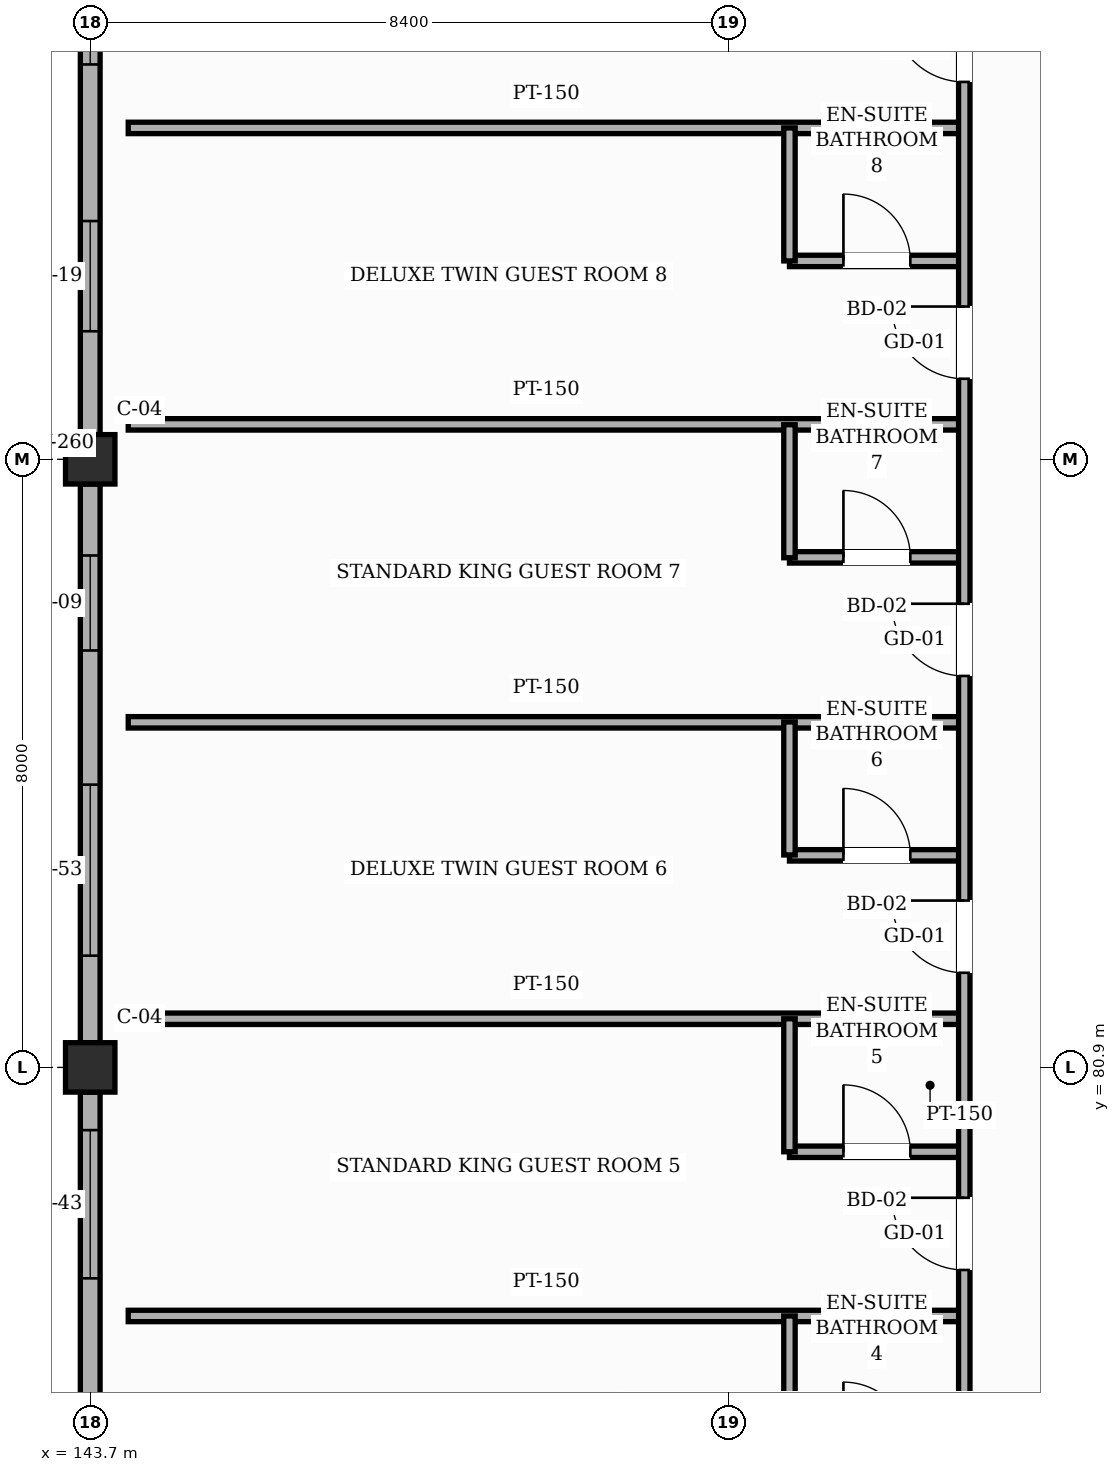
"""IFC4 building model, lengths in metres.
Left out: names, types, materials, properties, quantities, classifications, styles, units other than length and angle.
Written with IfcOpenShell. Run it as: python <this file> out.ifc"""

import sys

from ifc_helpers import new_model, si_unit, direction, frame, frame_2d, origin, origin_2d, place, context, subcontext, project, spatial, rectangle, hollow_rectangle, extrude, element, fill, save


model = new_model("IFC4")
c1 = context("Model", 3, precision=1e-05, world=origin(), true_north=direction((0.0, 1.0)))
c2 = subcontext(c1, "Body", "Model", "MODEL_VIEW")
j1 = project(units=[si_unit("LENGTHUNIT", "METRE"), si_unit("PLANEANGLEUNIT", "RADIAN")], contexts=[c1])
p1 = place(None, origin())
s1 = spatial("IfcSite", under=j1, at=p1, CompositionType="ELEMENT")
p2 = place(p1, origin())
s2 = spatial("IfcBuilding", under=s1, at=p2, CompositionType="ELEMENT")
p3 = place(p2, frame((0.0, 0.0, 15.0)))
s3 = spatial("IfcBuildingStorey", under=s2, at=p3, CompositionType="ELEMENT", Elevation=15.0)
for number, where, z_axis, x_axis in (
    (1, (143.7, 80.9, 0.0), (0.0, 0.0, 1.0), (1.0, 0.0, 0.0)),
    (2, (143.7, 88.9, 0.0), (0.0, 0.0, 1.0), (1.0, 0.0, 0.0)),
):
    element("IfcColumn", number, at=place(p3, frame(where, z_axis=z_axis, x_axis=x_axis)), inside=s3, PredefinedType="COLUMN", context=c2, shape_type="SweptSolid", body=[
        extrude(hollow_rectangle(XDim=0.65, YDim=0.65, WallThickness=0.025, InnerFilletRadius=0.025, OuterFilletRadius=0.05, at=origin_2d()), origin(), (0.0, 0.0, 1.0), 4.8),
    ])
p4 = place(p3, frame((143.7, 73.675, 0.0), z_axis=(0.0, 0.0, 1.0), x_axis=(0.0, 1.0, 0.0)))
e3 = element("IfcWall", 3, at=p4, inside=s3, PredefinedType="SOLIDWALL", context=c2, shape_type="SweptSolid", body=[
    extrude(rectangle(XDim=6.9, YDim=0.26, at=frame_2d((3.45, 0.0))), origin(), (0.0, 0.0, 1.0), 3.985),
])
p5 = place(p4, frame((1.125, 0.0, 0.85)))
e4 = element("IfcOpeningElement", 4, at=p5, cuts=e3, PredefinedType="OPENING", context=c2, shape_type="SweptSolid", body=[
    extrude(rectangle(XDim=1.75, YDim=1.65, at=frame_2d((0.875, 0.825))), frame((0.0, 0.14, 0.0), z_axis=(0.0, -1.0, 0.0), x_axis=(1.0, 0.0, 0.0)), (0.0, 0.0, 1.0), 0.28),
])
p6 = place(p4, frame((4.45, 0.0, 0.85)))
e5 = element("IfcOpeningElement", 5, at=p6, cuts=e3, PredefinedType="OPENING", context=c2, shape_type="SweptSolid", body=[
    extrude(rectangle(XDim=1.95, YDim=1.65, at=frame_2d((0.975, 0.825))), frame((0.0, 0.14, 0.0), z_axis=(0.0, -1.0, 0.0), x_axis=(1.0, 0.0, 0.0)), (0.0, 0.0, 1.0), 0.28),
])
p7 = place(p3, frame((143.7, 81.225, 0.0), z_axis=(0.0, 0.0, 1.0), x_axis=(0.0, 1.0, 0.0)))
e6 = element("IfcWall", 6, at=p7, inside=s3, PredefinedType="SOLIDWALL", context=c2, shape_type="SweptSolid", body=[
    extrude(rectangle(XDim=7.35, YDim=0.26, at=frame_2d((3.675, 0.0))), origin(), (0.0, 0.0, 1.0), 3.985),
])
p8 = place(p7, frame((1.145, 0.0, 0.85)))
e7 = element("IfcOpeningElement", 7, at=p8, cuts=e6, PredefinedType="OPENING", context=c2, shape_type="SweptSolid", body=[
    extrude(rectangle(XDim=2.25, YDim=1.65, at=frame_2d((1.125, 0.825))), frame((0.0, 0.14, 0.0), z_axis=(0.0, -1.0, 0.0), x_axis=(1.0, 0.0, 0.0)), (0.0, 0.0, 1.0), 0.28),
])
p9 = place(p7, frame((5.16, 0.0, 0.85)))
e8 = element("IfcOpeningElement", 8, at=p9, cuts=e6, PredefinedType="OPENING", context=c2, shape_type="SweptSolid", body=[
    extrude(rectangle(XDim=1.25, YDim=1.8, at=frame_2d((0.625, 0.9))), frame((0.0, 0.14, 0.0), z_axis=(0.0, -1.0, 0.0), x_axis=(1.0, 0.0, 0.0)), (0.0, 0.0, 1.0), 0.28),
])
p10 = place(p3, frame((143.7, 89.225, 0.0), z_axis=(0.0, 0.0, 1.0), x_axis=(0.0, 1.0, 0.0)))
e9 = element("IfcWall", 9, at=p10, inside=s3, PredefinedType="SOLIDWALL", context=c2, shape_type="SweptSolid", body=[
    extrude(rectangle(XDim=7.35, YDim=0.26, at=frame_2d((3.675, 0.0))), origin(), (0.0, 0.0, 1.0), 3.985),
])
p11 = place(p10, frame((1.36, 0.0, 0.85)))
e10 = element("IfcOpeningElement", 10, at=p11, cuts=e9, PredefinedType="OPENING", context=c2, shape_type="SweptSolid", body=[
    extrude(rectangle(XDim=1.45, YDim=1.8, at=frame_2d((0.725, 0.9))), frame((0.0, 0.14, 0.0), z_axis=(0.0, -1.0, 0.0), x_axis=(1.0, 0.0, 0.0)), (0.0, 0.0, 1.0), 0.28),
])
p12 = place(p10, frame((4.87, 0.0, 0.85)))
e11 = element("IfcOpeningElement", 11, at=p12, cuts=e9, PredefinedType="OPENING", context=c2, shape_type="SweptSolid", body=[
    extrude(rectangle(XDim=1.65, YDim=1.8, at=frame_2d((0.825, 0.9))), frame((0.0, 0.14, 0.0), z_axis=(0.0, -1.0, 0.0), x_axis=(1.0, 0.0, 0.0)), (0.0, 0.0, 1.0), 0.28),
])
p13 = place(p3, frame((144.2, 77.63, 0.0), z_axis=(0.0, 0.0, 1.0), x_axis=(1.0, 0.0, 0.0)))
e12 = element("IfcWall", 12, at=p13, inside=s3, PredefinedType="PARTITIONING", context=c2, shape_type="SweptSolid", body=[
    extrude(rectangle(XDim=11.0, YDim=0.15, at=frame_2d((5.5, 0.0))), origin(), (0.0, 0.0, 1.0), 4.545),
])
p14 = place(p3, frame((152.9, 79.79, 0.0), z_axis=(0.0, 0.0, 1.0), x_axis=(1.0, 0.0, 0.0)))
e13 = element("IfcWall", 13, at=p14, inside=s3, PredefinedType="PARTITIONING", context=c2, shape_type="SweptSolid", body=[
    extrude(rectangle(XDim=2.3, YDim=0.15, at=frame_2d((1.15, 0.0))), origin(), (0.0, 0.0, 1.0), 4.545),
])
p15 = place(p14, frame((0.71, 0.0, 0.0)))
e14 = element("IfcOpeningElement", 14, at=p15, cuts=e13, PredefinedType="OPENING", context=c2, shape_type="SweptSolid", body=[
    extrude(rectangle(XDim=0.88, YDim=2.12, at=frame_2d((0.44, 1.06))), frame((0.0, 0.085, 0.0), z_axis=(0.0, -1.0, 0.0), x_axis=(1.0, 0.0, 0.0)), (0.0, 0.0, 1.0), 0.17),
])
p16 = place(p3, frame((144.2, 81.54, 0.0), z_axis=(0.0, 0.0, 1.0), x_axis=(1.0, 0.0, 0.0)))
e15 = element("IfcWall", 15, at=p16, inside=s3, PredefinedType="PARTITIONING", context=c2, shape_type="SweptSolid", body=[
    extrude(rectangle(XDim=11.0, YDim=0.15, at=frame_2d((5.5, 0.0))), origin(), (0.0, 0.0, 1.0), 4.545),
])
p17 = place(p3, frame((152.9, 83.69, 0.0), z_axis=(0.0, 0.0, 1.0), x_axis=(1.0, 0.0, 0.0)))
e16 = element("IfcWall", 16, at=p17, inside=s3, PredefinedType="PARTITIONING", context=c2, shape_type="SweptSolid", body=[
    extrude(rectangle(XDim=2.3, YDim=0.15, at=frame_2d((1.15, 0.0))), origin(), (0.0, 0.0, 1.0), 4.545),
])
p18 = place(p17, frame((0.71, 0.0, 0.0)))
e17 = element("IfcOpeningElement", 17, at=p18, cuts=e16, PredefinedType="OPENING", context=c2, shape_type="SweptSolid", body=[
    extrude(rectangle(XDim=0.88, YDim=2.12, at=frame_2d((0.44, 1.06))), frame((0.0, 0.085, 0.0), z_axis=(0.0, -1.0, 0.0), x_axis=(1.0, 0.0, 0.0)), (0.0, 0.0, 1.0), 0.17),
])
p19 = place(p3, frame((144.2, 85.44, 0.0), z_axis=(0.0, 0.0, 1.0), x_axis=(1.0, 0.0, 0.0)))
e18 = element("IfcWall", 18, at=p19, inside=s3, PredefinedType="PARTITIONING", context=c2, shape_type="SweptSolid", body=[
    extrude(rectangle(XDim=11.0, YDim=0.15, at=frame_2d((5.5, 0.0))), origin(), (0.0, 0.0, 1.0), 4.545),
])
p20 = place(p3, frame((152.9, 87.61, 0.0), z_axis=(0.0, 0.0, 1.0), x_axis=(1.0, 0.0, 0.0)))
e19 = element("IfcWall", 19, at=p20, inside=s3, PredefinedType="PARTITIONING", context=c2, shape_type="SweptSolid", body=[
    extrude(rectangle(XDim=2.3, YDim=0.15, at=frame_2d((1.15, 0.0))), origin(), (0.0, 0.0, 1.0), 4.545),
])
p21 = place(p20, frame((0.71, 0.0, 0.0)))
e20 = element("IfcOpeningElement", 20, at=p21, cuts=e19, PredefinedType="OPENING", context=c2, shape_type="SweptSolid", body=[
    extrude(rectangle(XDim=0.88, YDim=2.12, at=frame_2d((0.44, 1.06))), frame((0.0, 0.085, 0.0), z_axis=(0.0, -1.0, 0.0), x_axis=(1.0, 0.0, 0.0)), (0.0, 0.0, 1.0), 0.17),
])
p22 = place(p3, frame((144.2, 89.36, 0.0), z_axis=(0.0, 0.0, 1.0), x_axis=(1.0, 0.0, 0.0)))
e21 = element("IfcWall", 21, at=p22, inside=s3, PredefinedType="PARTITIONING", context=c2, shape_type="SweptSolid", body=[
    extrude(rectangle(XDim=11.0, YDim=0.15, at=frame_2d((5.5, 0.0))), origin(), (0.0, 0.0, 1.0), 3.095),
])
p23 = place(p3, frame((152.9, 91.51, 0.0), z_axis=(0.0, 0.0, 1.0), x_axis=(1.0, 0.0, 0.0)))
e22 = element("IfcWall", 22, at=p23, inside=s3, PredefinedType="PARTITIONING", context=c2, shape_type="SweptSolid", body=[
    extrude(rectangle(XDim=2.3, YDim=0.15, at=frame_2d((1.15, 0.0))), origin(), (0.0, 0.0, 1.0), 4.545),
])
p24 = place(p23, frame((0.71, 0.0, 0.0)))
e23 = element("IfcOpeningElement", 23, at=p24, cuts=e22, PredefinedType="OPENING", context=c2, shape_type="SweptSolid", body=[
    extrude(rectangle(XDim=0.88, YDim=2.12, at=frame_2d((0.44, 1.06))), frame((0.0, 0.085, 0.0), z_axis=(0.0, -1.0, 0.0), x_axis=(1.0, 0.0, 0.0)), (0.0, 0.0, 1.0), 0.17),
])
p25 = place(p3, frame((144.2, 93.26, 0.0), z_axis=(0.0, 0.0, 1.0), x_axis=(1.0, 0.0, 0.0)))
e24 = element("IfcWall", 24, at=p25, inside=s3, PredefinedType="PARTITIONING", context=c2, shape_type="SweptSolid", body=[
    extrude(rectangle(XDim=11.0, YDim=0.15, at=frame_2d((5.5, 0.0))), origin(), (0.0, 0.0, 1.0), 4.545),
])
for number, where, z_axis, x_axis in (
    (25, (152.9, 75.88, 0.0), (0.0, 0.0, 1.0), (0.0, 1.0, 0.0)),
    (26, (152.9, 79.79, 0.0), (0.0, 0.0, 1.0), (0.0, 1.0, 0.0)),
    (27, (152.9, 83.695, 0.0), (0.0, 0.0, 1.0), (0.0, 1.0, 0.0)),
    (28, (152.9, 87.605, 0.0), (0.0, 0.0, 1.0), (0.0, 1.0, 0.0)),
    (29, (152.9, 91.51, 0.0), (0.0, 0.0, 1.0), (0.0, 1.0, 0.0)),
):
    element("IfcWall", number, at=place(p3, frame(where, z_axis=z_axis, x_axis=x_axis)), inside=s3, PredefinedType="PARTITIONING", context=c2, shape_type="SweptSolid", body=[
        extrude(rectangle(XDim=1.75, YDim=0.15, at=frame_2d((0.875, 0.0))), origin(), (0.0, 0.0, 1.0), 4.545),
    ])
p26 = place(p3, frame((155.2, 62.0, 0.0), z_axis=(0.0, 0.0, 1.0), x_axis=(0.0, 1.0, 0.0)))
e30 = element("IfcWall", 30, at=p26, inside=s3, PredefinedType="PARTITIONING", context=c2, shape_type="SweptSolid", body=[
    extrude(rectangle(XDim=50.8, YDim=0.15, at=frame_2d((25.4, 0.0))), origin(), (0.0, 0.0, 1.0), 4.545),
])
p27 = place(p26, frame((0.53, 0.0, 0.0)))
e31 = element("IfcOpeningElement", 31, at=p27, cuts=e30, PredefinedType="OPENING", context=c2, shape_type="SweptSolid", body=[
    extrude(rectangle(XDim=1.1, YDim=2.2, at=frame_2d((0.55, 1.1))), frame((0.0, 0.085, 0.0), z_axis=(0.0, -1.0, 0.0), x_axis=(1.0, 0.0, 0.0)), (0.0, 0.0, 1.0), 0.17),
])
p28 = place(p26, frame((4.51, 0.0, 0.0)))
e32 = element("IfcOpeningElement", 32, at=p28, cuts=e30, PredefinedType="OPENING", context=c2, shape_type="SweptSolid", body=[
    extrude(rectangle(XDim=0.95, YDim=2.15, at=frame_2d((0.475, 1.075))), frame((0.0, 0.085, 0.0), z_axis=(0.0, -1.0, 0.0), x_axis=(1.0, 0.0, 0.0)), (0.0, 0.0, 1.0), 0.17),
])
p29 = place(p26, frame((8.42, 0.0, 0.0)))
e33 = element("IfcOpeningElement", 33, at=p29, cuts=e30, PredefinedType="OPENING", context=c2, shape_type="SweptSolid", body=[
    extrude(rectangle(XDim=0.95, YDim=2.15, at=frame_2d((0.475, 1.075))), frame((0.0, 0.085, 0.0), z_axis=(0.0, -1.0, 0.0), x_axis=(1.0, 0.0, 0.0)), (0.0, 0.0, 1.0), 0.17),
])
p30 = place(p26, frame((12.33, 0.0, 0.0)))
e34 = element("IfcOpeningElement", 34, at=p30, cuts=e30, PredefinedType="OPENING", context=c2, shape_type="SweptSolid", body=[
    extrude(rectangle(XDim=0.95, YDim=2.15, at=frame_2d((0.475, 1.075))), frame((0.0, 0.085, 0.0), z_axis=(0.0, -1.0, 0.0), x_axis=(1.0, 0.0, 0.0)), (0.0, 0.0, 1.0), 0.17),
])
p31 = place(p26, frame((16.235, 0.0, 0.0)))
e35 = element("IfcOpeningElement", 35, at=p31, cuts=e30, PredefinedType="OPENING", context=c2, shape_type="SweptSolid", body=[
    extrude(rectangle(XDim=0.95, YDim=2.15, at=frame_2d((0.475, 1.075))), frame((0.0, 0.085, 0.0), z_axis=(0.0, -1.0, 0.0), x_axis=(1.0, 0.0, 0.0)), (0.0, 0.0, 1.0), 0.17),
])
p32 = place(p26, frame((20.145, 0.0, 0.0)))
e36 = element("IfcOpeningElement", 36, at=p32, cuts=e30, PredefinedType="OPENING", context=c2, shape_type="SweptSolid", body=[
    extrude(rectangle(XDim=0.95, YDim=2.15, at=frame_2d((0.475, 1.075))), frame((0.0, 0.085, 0.0), z_axis=(0.0, -1.0, 0.0), x_axis=(1.0, 0.0, 0.0)), (0.0, 0.0, 1.0), 0.17),
])
p33 = place(p26, frame((24.05, 0.0, 0.0)))
e37 = element("IfcOpeningElement", 37, at=p33, cuts=e30, PredefinedType="OPENING", context=c2, shape_type="SweptSolid", body=[
    extrude(rectangle(XDim=0.95, YDim=2.15, at=frame_2d((0.475, 1.075))), frame((0.0, 0.085, 0.0), z_axis=(0.0, -1.0, 0.0), x_axis=(1.0, 0.0, 0.0)), (0.0, 0.0, 1.0), 0.17),
])
p34 = place(p26, frame((27.96, 0.0, 0.0)))
e38 = element("IfcOpeningElement", 38, at=p34, cuts=e30, PredefinedType="OPENING", context=c2, shape_type="SweptSolid", body=[
    extrude(rectangle(XDim=0.95, YDim=2.15, at=frame_2d((0.475, 1.075))), frame((0.0, 0.085, 0.0), z_axis=(0.0, -1.0, 0.0), x_axis=(1.0, 0.0, 0.0)), (0.0, 0.0, 1.0), 0.17),
])
p35 = place(p26, frame((31.865, 0.0, 0.0)))
e39 = element("IfcOpeningElement", 39, at=p35, cuts=e30, PredefinedType="OPENING", context=c2, shape_type="SweptSolid", body=[
    extrude(rectangle(XDim=0.95, YDim=2.15, at=frame_2d((0.475, 1.075))), frame((0.0, 0.085, 0.0), z_axis=(0.0, -1.0, 0.0), x_axis=(1.0, 0.0, 0.0)), (0.0, 0.0, 1.0), 0.17),
])
p36 = place(p26, frame((35.77, 0.0, 0.0)))
e40 = element("IfcOpeningElement", 40, at=p36, cuts=e30, PredefinedType="OPENING", context=c2, shape_type="SweptSolid", body=[
    extrude(rectangle(XDim=0.95, YDim=2.15, at=frame_2d((0.475, 1.075))), frame((0.0, 0.085, 0.0), z_axis=(0.0, -1.0, 0.0), x_axis=(1.0, 0.0, 0.0)), (0.0, 0.0, 1.0), 0.17),
])
p37 = place(p26, frame((39.68, 0.0, 0.0)))
e41 = element("IfcOpeningElement", 41, at=p37, cuts=e30, PredefinedType="OPENING", context=c2, shape_type="SweptSolid", body=[
    extrude(rectangle(XDim=0.95, YDim=2.15, at=frame_2d((0.475, 1.075))), frame((0.0, 0.085, 0.0), z_axis=(0.0, -1.0, 0.0), x_axis=(1.0, 0.0, 0.0)), (0.0, 0.0, 1.0), 0.17),
])
p38 = place(p26, frame((43.59, 0.0, 0.0)))
e42 = element("IfcOpeningElement", 42, at=p38, cuts=e30, PredefinedType="OPENING", context=c2, shape_type="SweptSolid", body=[
    extrude(rectangle(XDim=0.95, YDim=2.15, at=frame_2d((0.475, 1.075))), frame((0.0, 0.085, 0.0), z_axis=(0.0, -1.0, 0.0), x_axis=(1.0, 0.0, 0.0)), (0.0, 0.0, 1.0), 0.17),
])
p39 = place(p26, frame((47.495, 0.0, 0.0)))
e43 = element("IfcOpeningElement", 43, at=p39, cuts=e30, PredefinedType="OPENING", context=c2, shape_type="SweptSolid", body=[
    extrude(rectangle(XDim=0.95, YDim=2.15, at=frame_2d((0.475, 1.075))), frame((0.0, 0.085, 0.0), z_axis=(0.0, -1.0, 0.0), x_axis=(1.0, 0.0, 0.0)), (0.0, 0.0, 1.0), 0.17),
])
p40 = place(p6, origin())
e44 = element("IfcWindow", 44, at=p40, inside=s3, PartitioningType="SINGLE_PANEL", PredefinedType="WINDOW", context=c2, shape_type="SweptSolid", body=[
    extrude(rectangle(XDim=1.95, YDim=1.65, at=frame_2d((0.975, 0.825))), frame((0.0, 0.03, 0.0), z_axis=(0.0, -1.0, 0.0), x_axis=(1.0, 0.0, 0.0)), (0.0, 0.0, 1.0), 0.06),
])
fill(e5, e44)
p41 = place(p8, origin())
e45 = element("IfcWindow", 45, at=p41, inside=s3, PartitioningType="SINGLE_PANEL", PredefinedType="WINDOW", context=c2, shape_type="SweptSolid", body=[
    extrude(rectangle(XDim=2.25, YDim=1.65, at=frame_2d((1.125, 0.825))), frame((0.0, 0.03, 0.0), z_axis=(0.0, -1.0, 0.0), x_axis=(1.0, 0.0, 0.0)), (0.0, 0.0, 1.0), 0.06),
])
fill(e7, e45)
p42 = place(p9, origin())
e46 = element("IfcWindow", 46, at=p42, inside=s3, PartitioningType="SINGLE_PANEL", PredefinedType="WINDOW", context=c2, shape_type="SweptSolid", body=[
    extrude(rectangle(XDim=1.25, YDim=1.8, at=frame_2d((0.625, 0.9))), frame((0.0, 0.03, 0.0), z_axis=(0.0, -1.0, 0.0), x_axis=(1.0, 0.0, 0.0)), (0.0, 0.0, 1.0), 0.06),
])
fill(e8, e46)
p43 = place(p11, origin())
e47 = element("IfcWindow", 47, at=p43, inside=s3, PartitioningType="SINGLE_PANEL", PredefinedType="WINDOW", context=c2, shape_type="SweptSolid", body=[
    extrude(rectangle(XDim=1.45, YDim=1.8, at=frame_2d((0.725, 0.9))), frame((0.0, 0.03, 0.0), z_axis=(0.0, -1.0, 0.0), x_axis=(1.0, 0.0, 0.0)), (0.0, 0.0, 1.0), 0.06),
])
fill(e10, e47)
p44 = place(p12, origin())
e48 = element("IfcWindow", 48, at=p44, inside=s3, PartitioningType="SINGLE_PANEL", PredefinedType="WINDOW", context=c2, shape_type="SweptSolid", body=[
    extrude(rectangle(XDim=1.65, YDim=1.8, at=frame_2d((0.825, 0.9))), frame((0.0, 0.03, 0.0), z_axis=(0.0, -1.0, 0.0), x_axis=(1.0, 0.0, 0.0)), (0.0, 0.0, 1.0), 0.06),
])
fill(e11, e48)
p45 = place(p31, origin())
e49 = element("IfcDoor", 49, at=p45, inside=s3, OperationType="SINGLE_SWING_RIGHT", PredefinedType="DOOR", context=c2, shape_type="SweptSolid", body=[
    extrude(rectangle(XDim=0.95, YDim=2.15, at=frame_2d((0.475, 1.075))), frame((0.0, 0.025, 0.0), z_axis=(0.0, -1.0, 0.0), x_axis=(1.0, 0.0, 0.0)), (0.0, 0.0, 1.0), 0.05),
])
fill(e35, e49)
p46 = place(p15, origin())
e50 = element("IfcDoor", 50, at=p46, inside=s3, OperationType="SINGLE_SWING_LEFT", PredefinedType="DOOR", context=c2, shape_type="SweptSolid", body=[
    extrude(rectangle(XDim=0.88, YDim=2.12, at=frame_2d((0.44, 1.06))), frame((0.0, 0.025, 0.0), z_axis=(0.0, -1.0, 0.0), x_axis=(1.0, 0.0, 0.0)), (0.0, 0.0, 1.0), 0.05),
])
fill(e14, e50)
p47 = place(p32, origin())
e51 = element("IfcDoor", 51, at=p47, inside=s3, OperationType="SINGLE_SWING_RIGHT", PredefinedType="DOOR", context=c2, shape_type="SweptSolid", body=[
    extrude(rectangle(XDim=0.95, YDim=2.15, at=frame_2d((0.475, 1.075))), frame((0.0, 0.025, 0.0), z_axis=(0.0, -1.0, 0.0), x_axis=(1.0, 0.0, 0.0)), (0.0, 0.0, 1.0), 0.05),
])
fill(e36, e51)
p48 = place(p18, origin())
e52 = element("IfcDoor", 52, at=p48, inside=s3, OperationType="SINGLE_SWING_LEFT", PredefinedType="DOOR", context=c2, shape_type="SweptSolid", body=[
    extrude(rectangle(XDim=0.88, YDim=2.12, at=frame_2d((0.44, 1.06))), frame((0.0, 0.025, 0.0), z_axis=(0.0, -1.0, 0.0), x_axis=(1.0, 0.0, 0.0)), (0.0, 0.0, 1.0), 0.05),
])
fill(e17, e52)
p49 = place(p33, origin())
e53 = element("IfcDoor", 53, at=p49, inside=s3, OperationType="SINGLE_SWING_RIGHT", PredefinedType="DOOR", context=c2, shape_type="SweptSolid", body=[
    extrude(rectangle(XDim=0.95, YDim=2.15, at=frame_2d((0.475, 1.075))), frame((0.0, 0.025, 0.0), z_axis=(0.0, -1.0, 0.0), x_axis=(1.0, 0.0, 0.0)), (0.0, 0.0, 1.0), 0.05),
])
fill(e37, e53)
p50 = place(p21, origin())
e54 = element("IfcDoor", 54, at=p50, inside=s3, OperationType="SINGLE_SWING_LEFT", PredefinedType="DOOR", context=c2, shape_type="SweptSolid", body=[
    extrude(rectangle(XDim=0.88, YDim=2.12, at=frame_2d((0.44, 1.06))), frame((0.0, 0.025, 0.0), z_axis=(0.0, -1.0, 0.0), x_axis=(1.0, 0.0, 0.0)), (0.0, 0.0, 1.0), 0.05),
])
fill(e20, e54)
p51 = place(p34, origin())
e55 = element("IfcDoor", 55, at=p51, inside=s3, OperationType="SINGLE_SWING_RIGHT", PredefinedType="DOOR", context=c2, shape_type="SweptSolid", body=[
    extrude(rectangle(XDim=0.95, YDim=2.15, at=frame_2d((0.475, 1.075))), frame((0.0, 0.025, 0.0), z_axis=(0.0, -1.0, 0.0), x_axis=(1.0, 0.0, 0.0)), (0.0, 0.0, 1.0), 0.05),
])
fill(e38, e55)
p52 = place(p24, origin())
e56 = element("IfcDoor", 56, at=p52, inside=s3, OperationType="SINGLE_SWING_LEFT", PredefinedType="DOOR", context=c2, shape_type="SweptSolid", body=[
    extrude(rectangle(XDim=0.88, YDim=2.12, at=frame_2d((0.44, 1.06))), frame((0.0, 0.025, 0.0), z_axis=(0.0, -1.0, 0.0), x_axis=(1.0, 0.0, 0.0)), (0.0, 0.0, 1.0), 0.05),
])
fill(e23, e56)
p53 = place(p35, origin())
e57 = element("IfcDoor", 57, at=p53, inside=s3, OperationType="SINGLE_SWING_RIGHT", PredefinedType="DOOR", context=c2, shape_type="SweptSolid", body=[
    extrude(rectangle(XDim=0.95, YDim=2.15, at=frame_2d((0.475, 1.075))), frame((0.0, 0.025, 0.0), z_axis=(0.0, -1.0, 0.0), x_axis=(1.0, 0.0, 0.0)), (0.0, 0.0, 1.0), 0.05),
])
fill(e39, e57)
save(model, sys.argv[1])
